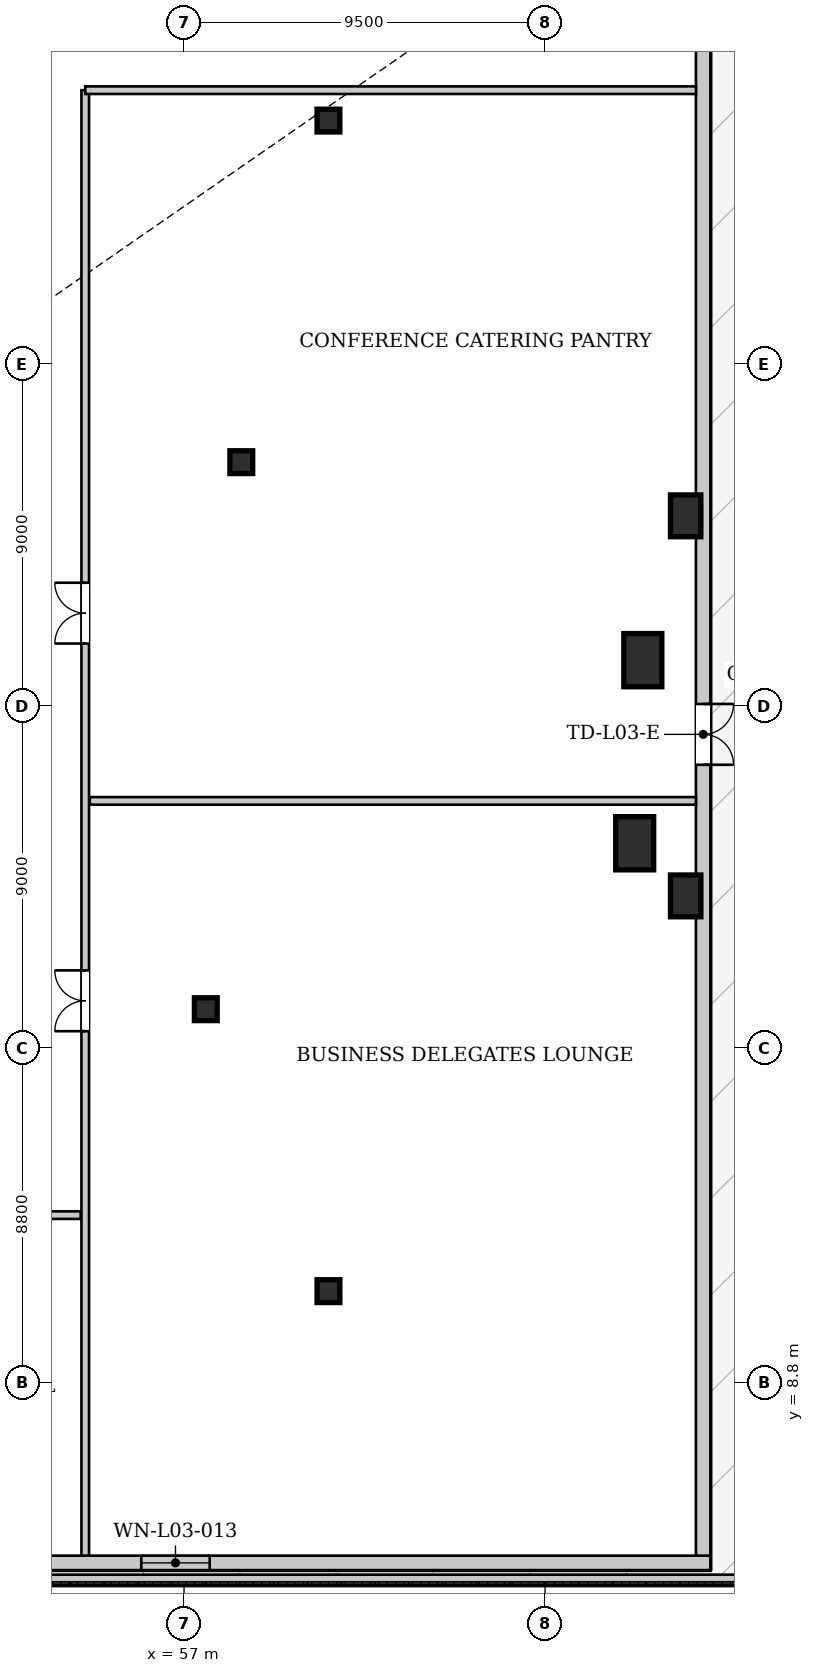
"""IFC4 building model, lengths in metres.
Left out: names, types, materials, properties, quantities, classifications, styles, units other than length and angle.
Written with IfcOpenShell. Run it as: python <this file> out.ifc"""

import sys

from ifc_helpers import new_model, si_unit, direction, frame, frame_2d, origin, origin_2d, place, context, subcontext, project, spatial, rectangle, hollow_rectangle, extrude, source, transform, mapped, element, fill, save


model = new_model("IFC4")
c1 = context("Model", 3, precision=1e-05, world=origin(), true_north=direction((0.0, 1.0)))
c2 = subcontext(c1, "Body", "Model", "MODEL_VIEW")
j1 = project(units=[si_unit("LENGTHUNIT", "METRE"), si_unit("PLANEANGLEUNIT", "RADIAN")], contexts=[c1])
p1 = place(None, origin())
s1 = spatial("IfcSite", under=j1, at=p1, CompositionType="ELEMENT")
p2 = place(p1, origin())
s2 = spatial("IfcBuilding", under=s1, at=p2, CompositionType="ELEMENT")
p3 = place(p2, frame((0.0, 0.0, 15.6)))
s3 = spatial("IfcBuildingStorey", under=s2, at=p3, CompositionType="ELEMENT", Elevation=15.6)
m1 = source(origin(), c2, "Body", "SweptSolid", [
    extrude(rectangle(XDim=1.0, YDim=1.4, at=origin_2d()), origin(), (0.0, 0.0, 1.0), 4.335),
])
for number, where, z_axis, x_axis in (
    (1, (68.858, 22.985, 0.0), (0.0, 0.0, 1.0), (1.0, 0.0, 0.0)),
    (2, (69.073, 27.803, 0.0), (0.0, 0.0, 1.0), (1.0, 0.0, 0.0)),
):
    element("IfcColumn", number, at=place(p3, frame(where, z_axis=z_axis, x_axis=x_axis)), inside=s3, PredefinedType="COLUMN", context=c2, shape_type="MappedRepresentation", body=[
        mapped(m1, transform((0.0, 0.0, 0.0), x_axis=(1.0, 0.0, 0.0), y_axis=(0.0, 1.0, 0.0), z_axis=(0.0, 0.0, 1.0), scale=1.0)),
    ])
m2 = source(origin(), c2, "Body", "SweptSolid", [
    extrude(hollow_rectangle(XDim=0.6, YDim=0.6, WallThickness=0.035, at=origin_2d()), origin(), (0.0, 0.0, 1.0), 4.335),
])
for number, where, z_axis, x_axis in (
    (3, (60.8, 11.2, 0.0), (0.0, 0.0, 1.0), (1.0, 0.0, 0.0)),
    (4, (60.8, 42.0, 0.0), (0.0, 0.0, 1.0), (1.0, 0.0, 0.0)),
    (5, (58.507, 33.013, 0.0), (0.0, 0.0, 1.0), (1.0, 0.0, 0.0)),
    (6, (57.572, 18.618, 0.0), (0.0, 0.0, 1.0), (1.0, 0.0, 0.0)),
):
    element("IfcColumn", number, at=place(p3, frame(where, z_axis=z_axis, x_axis=x_axis)), inside=s3, PredefinedType="COLUMN", context=c2, shape_type="MappedRepresentation", body=[
        mapped(m2, transform((0.0, 0.0, 0.0), x_axis=(1.0, 0.0, 0.0), y_axis=(0.0, 1.0, 0.0), z_axis=(0.0, 0.0, 1.0), scale=1.0)),
    ])
m3 = source(origin(), c2, "Body", "SweptSolid", [
    extrude(rectangle(XDim=0.8, YDim=1.1, at=origin_2d()), origin(), (0.0, 0.0, 1.0), 4.335),
])
for number, where, z_axis, x_axis in (
    (7, (70.2, 21.6, 0.0), (0.0, 0.0, 1.0), (1.0, 0.0, 0.0)),
    (8, (70.2, 31.6, 0.0), (0.0, 0.0, 1.0), (1.0, 0.0, 0.0)),
):
    element("IfcColumn", number, at=place(p3, frame(where, z_axis=z_axis, x_axis=x_axis)), inside=s3, PredefinedType="COLUMN", context=c2, shape_type="MappedRepresentation", body=[
        mapped(m3, transform((0.0, 0.0, 0.0), x_axis=(1.0, 0.0, 0.0), y_axis=(0.0, 1.0, 0.0), z_axis=(0.0, 0.0, 1.0), scale=1.0)),
    ])
p4 = place(p3, frame((70.85, 4.05, 0.0), z_axis=(0.0, 0.0, 1.0), x_axis=(-1.0, 0.0, 0.0)))
e9 = element("IfcWall", 9, at=p4, inside=s3, PredefinedType="SOLIDWALL", context=c2, shape_type="SweptSolid", body=[
    extrude(rectangle(XDim=29.65, YDim=0.38, at=frame_2d((14.825, 0.0))), origin(), (0.0, 0.0, 1.0), 3.622),
])
p5 = place(p4, frame((13.175, 0.0, 0.85)))
e10 = element("IfcOpeningElement", 10, at=p5, cuts=e9, PredefinedType="OPENING", context=c2, shape_type="SweptSolid", body=[
    extrude(rectangle(XDim=1.8, YDim=2.4, at=frame_2d((0.9, 1.2))), frame((0.0, 0.2, 0.0), z_axis=(0.0, -1.0, 0.0), x_axis=(1.0, 0.0, 0.0)), (0.0, 0.0, 1.0), 0.4),
])
p6 = place(p3, frame((70.66, 48.96, 0.0), z_axis=(0.0, 0.0, 1.0), x_axis=(0.0, -1.0, 0.0)))
e11 = element("IfcWall", 11, at=p6, inside=s3, PredefinedType="SOLIDWALL", context=c2, shape_type="SweptSolid", body=[
    extrude(rectangle(XDim=44.72, YDim=0.38, at=frame_2d((22.36, 0.0))), origin(), (0.0, 0.0, 1.0), 3.622),
])
p7 = place(p6, frame((22.31, 0.0, 0.0)))
e12 = element("IfcOpeningElement", 12, at=p7, cuts=e11, PredefinedType="OPENING", context=c2, shape_type="SweptSolid", body=[
    extrude(rectangle(XDim=1.6, YDim=2.3, at=frame_2d((0.8, 1.15))), frame((0.0, 0.2, 0.0), z_axis=(0.0, -1.0, 0.0), x_axis=(1.0, 0.0, 0.0)), (0.0, 0.0, 1.0), 0.4),
])
p8 = place(p3, frame((4.3, 3.6, 0.0), z_axis=(0.0, 0.0, 1.0), x_axis=(1.0, 0.0, 0.0)))
e13 = element("IfcWall", 13, at=p8, inside=s3, PredefinedType="PARAPET", context=c2, shape_type="SweptSolid", body=[
    extrude(rectangle(XDim=67.4, YDim=0.28, at=frame_2d((33.7, 0.0))), origin(), (0.0, 0.0, 1.0), 0.45),
])
p9 = place(p3, frame((21.92, 13.2, 0.0), z_axis=(0.0, 0.0, 1.0), x_axis=(1.0, 0.0, 0.0)))
e14 = element("IfcWall", 14, at=p9, inside=s3, PredefinedType="PARTITIONING", context=c2, shape_type="SweptSolid", body=[
    extrude(rectangle(XDim=32.36, YDim=0.2, at=frame_2d((16.18, 0.0))), origin(), (0.0, 0.0, 1.0), 3.53),
])
p10 = place(p9, frame((13.5, 0.0, 0.0)))
e15 = element("IfcOpeningElement", 15, at=p10, cuts=e14, PredefinedType="OPENING", context=c2, shape_type="SweptSolid", body=[
    extrude(rectangle(XDim=1.6, YDim=2.2, at=frame_2d((0.8, 1.1))), frame((0.0, 0.11, 0.0), z_axis=(0.0, -1.0, 0.0), x_axis=(1.0, 0.0, 0.0)), (0.0, 0.0, 1.0), 0.22),
])
p11 = place(p3, frame((54.4, 4.24, 0.0), z_axis=(0.0, 0.0, 1.0), x_axis=(0.0, 1.0, 0.0)))
e16 = element("IfcWall", 16, at=p11, inside=s3, PredefinedType="PARTITIONING", context=c2, shape_type="SweptSolid", body=[
    extrude(rectangle(XDim=38.56, YDim=0.2, at=frame_2d((19.28, 0.0))), origin(), (0.0, 0.0, 1.0), 3.53),
])
p12 = place(p11, frame((13.8, 0.0, 0.0)))
e17 = element("IfcOpeningElement", 17, at=p12, cuts=e16, PredefinedType="OPENING", context=c2, shape_type="SweptSolid", body=[
    extrude(rectangle(XDim=1.6, YDim=2.2, at=frame_2d((0.8, 1.1))), frame((0.0, 0.11, 0.0), z_axis=(0.0, -1.0, 0.0), x_axis=(1.0, 0.0, 0.0)), (0.0, 0.0, 1.0), 0.22),
])
p13 = place(p11, frame((24.0, 0.0, 0.0)))
e18 = element("IfcOpeningElement", 18, at=p13, cuts=e16, PredefinedType="OPENING", context=c2, shape_type="SweptSolid", body=[
    extrude(rectangle(XDim=1.6, YDim=2.2, at=frame_2d((0.8, 1.1))), frame((0.0, 0.11, 0.0), z_axis=(0.0, -1.0, 0.0), x_axis=(1.0, 0.0, 0.0)), (0.0, 0.0, 1.0), 0.22),
])
p14 = place(p3, frame((54.52, 24.1, 0.0), z_axis=(0.0, 0.0, 1.0), x_axis=(1.0, 0.0, 0.0)))
e19 = element("IfcWall", 19, at=p14, inside=s3, PredefinedType="PARTITIONING", context=c2, shape_type="SweptSolid", body=[
    extrude(rectangle(XDim=15.95, YDim=0.2, at=frame_2d((7.975, 0.0))), origin(), (0.0, 0.0, 1.0), 3.53),
])
p15 = place(p3, frame((54.4, 42.8, 0.0), z_axis=(0.0, 0.0, 1.0), x_axis=(1.0, 0.0, 0.0)))
e20 = element("IfcWall", 20, at=p15, inside=s3, PredefinedType="PARTITIONING", context=c2, shape_type="SweptSolid", body=[
    extrude(rectangle(XDim=16.07, YDim=0.2, at=frame_2d((8.035, 0.0))), origin(), (0.0, 0.0, 1.0), 3.53),
])
m4 = source(origin(), c2, "Body", "SweptSolid", [
    extrude(rectangle(XDim=1.6, YDim=2.3, at=frame_2d((0.8, 1.15))), frame((0.0, 0.025, 0.0), z_axis=(0.0, -1.0, 0.0), x_axis=(1.0, 0.0, 0.0)), (0.0, 0.0, 1.0), 0.05),
])
p16 = place(p7, origin())
e21 = element("IfcDoor", 21, at=p16, inside=s3, OperationType="DOUBLE_DOOR_SINGLE_SWING", PredefinedType="DOOR", context=c2, shape_type="MappedRepresentation", body=[
    mapped(m4, transform((0.0, 0.0, 0.0), x_axis=(1.0, 0.0, 0.0), y_axis=(0.0, 1.0, 0.0), z_axis=(0.0, 0.0, 1.0), scale=1.0)),
])
fill(e12, e21)
m5 = source(origin(), c2, "Body", "SweptSolid", [
    extrude(rectangle(XDim=1.8, YDim=2.4, at=frame_2d((0.9, 1.2))), frame((0.0, 0.03, 0.0), z_axis=(0.0, -1.0, 0.0), x_axis=(1.0, 0.0, 0.0)), (0.0, 0.0, 1.0), 0.06),
])
p17 = place(p5, origin())
e22 = element("IfcWindow", 22, at=p17, inside=s3, PartitioningType="SINGLE_PANEL", PredefinedType="WINDOW", context=c2, shape_type="MappedRepresentation", body=[
    mapped(m5, transform((0.0, 0.0, 0.0), x_axis=(1.0, 0.0, 0.0), y_axis=(0.0, 1.0, 0.0), z_axis=(0.0, 0.0, 1.0), scale=1.0)),
])
fill(e10, e22)
m6 = source(origin(), c2, "Body", "SweptSolid", [
    extrude(rectangle(XDim=1.6, YDim=2.2, at=frame_2d((0.8, 1.1))), frame((0.0, 0.025, 0.0), z_axis=(0.0, -1.0, 0.0), x_axis=(1.0, 0.0, 0.0)), (0.0, 0.0, 1.0), 0.05),
])
p18 = place(p12, origin())
e23 = element("IfcDoor", 23, at=p18, inside=s3, OperationType="DOUBLE_DOOR_SINGLE_SWING", PredefinedType="DOOR", context=c2, shape_type="MappedRepresentation", body=[
    mapped(m6, transform((0.0, 0.0, 0.0), x_axis=(1.0, 0.0, 0.0), y_axis=(0.0, 1.0, 0.0), z_axis=(0.0, 0.0, 1.0), scale=1.0)),
])
fill(e17, e23)
p19 = place(p13, origin())
e24 = element("IfcDoor", 24, at=p19, inside=s3, OperationType="DOUBLE_DOOR_SINGLE_SWING", PredefinedType="DOOR", context=c2, shape_type="MappedRepresentation", body=[
    mapped(m6, transform((0.0, 0.0, 0.0), x_axis=(1.0, 0.0, 0.0), y_axis=(0.0, 1.0, 0.0), z_axis=(0.0, 0.0, 1.0), scale=1.0)),
])
fill(e18, e24)
save(model, sys.argv[1])
